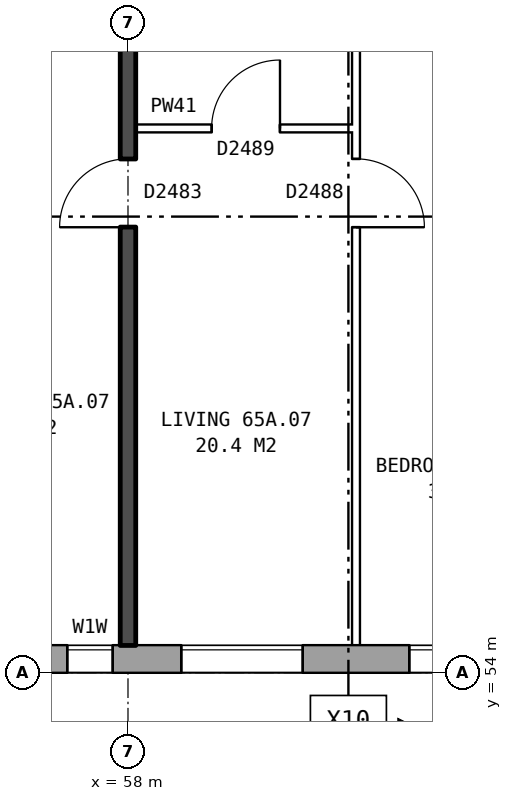
"""IFC4 building model, lengths in metres.
Left out: names, types, materials, properties, quantities, classifications, styles, units other than length and angle.
Written with IfcOpenShell. Run it as: python <this file> out.ifc"""

import sys

from ifc_helpers import new_model, si_unit, direction, frame, frame_2d, origin, place, context, subcontext, project, spatial, rectangle, extrude, element, fill, save


model = new_model("IFC4")
c1 = context("Model", 3, precision=1e-05, world=origin(), true_north=direction((0.0, 1.0)))
c2 = subcontext(c1, "Body", "Model", "MODEL_VIEW")
j1 = project(units=[si_unit("LENGTHUNIT", "METRE"), si_unit("PLANEANGLEUNIT", "RADIAN")], contexts=[c1])
p1 = place(None, origin())
s1 = spatial("IfcSite", under=j1, at=p1, CompositionType="ELEMENT")
p2 = place(p1, origin())
s2 = spatial("IfcBuilding", under=s1, at=p2, CompositionType="ELEMENT")
p3 = place(p2, frame((0.0, 0.0, 230.7)))
s3 = spatial("IfcBuildingStorey", under=s2, at=p3, CompositionType="ELEMENT", Elevation=230.7)
p4 = place(p3, frame((35.075, 54.18, 0.0), z_axis=(0.0, 0.0, 1.0), x_axis=(1.0, 0.0, 0.0)))
e1 = element("IfcWall", 1, at=p4, inside=s3, PredefinedType="STANDARD", context=c2, shape_type="SweptSolid", body=[
    extrude(rectangle(XDim=39.875, YDim=0.36, at=frame_2d((19.938, 0.0))), origin(), (0.0, 0.0, 1.0), 2.85),
])
p5 = place(p4, frame((2.625, 0.0, 0.8)))
e2 = element("IfcOpeningElement", 2, at=p5, cuts=e1, PredefinedType="OPENING", context=c2, shape_type="SweptSolid", body=[
    extrude(rectangle(XDim=1.6, YDim=1.8, at=frame_2d((0.8, 0.9))), frame((0.0, 0.19, 0.0), z_axis=(0.0, -1.0, 0.0), x_axis=(1.0, 0.0, 0.0)), (0.0, 0.0, 1.0), 0.38),
])
p6 = place(p4, frame((5.625, 0.0, 0.8)))
e3 = element("IfcOpeningElement", 3, at=p6, cuts=e1, PredefinedType="OPENING", context=c2, shape_type="SweptSolid", body=[
    extrude(rectangle(XDim=1.6, YDim=1.8, at=frame_2d((0.8, 0.9))), frame((0.0, 0.19, 0.0), z_axis=(0.0, -1.0, 0.0), x_axis=(1.0, 0.0, 0.0)), (0.0, 0.0, 1.0), 0.38),
])
p7 = place(p4, frame((8.625, 0.0, 0.8)))
e4 = element("IfcOpeningElement", 4, at=p7, cuts=e1, PredefinedType="OPENING", context=c2, shape_type="SweptSolid", body=[
    extrude(rectangle(XDim=1.6, YDim=1.8, at=frame_2d((0.8, 0.9))), frame((0.0, 0.19, 0.0), z_axis=(0.0, -1.0, 0.0), x_axis=(1.0, 0.0, 0.0)), (0.0, 0.0, 1.0), 0.38),
])
p8 = place(p4, frame((11.625, 0.0, 0.8)))
e5 = element("IfcOpeningElement", 5, at=p8, cuts=e1, PredefinedType="OPENING", context=c2, shape_type="SweptSolid", body=[
    extrude(rectangle(XDim=1.6, YDim=1.8, at=frame_2d((0.8, 0.9))), frame((0.0, 0.19, 0.0), z_axis=(0.0, -1.0, 0.0), x_axis=(1.0, 0.0, 0.0)), (0.0, 0.0, 1.0), 0.38),
])
p9 = place(p4, frame((14.075, 0.0, 0.8)))
e6 = element("IfcOpeningElement", 6, at=p9, cuts=e1, PredefinedType="OPENING", context=c2, shape_type="SweptSolid", body=[
    extrude(rectangle(XDim=1.0, YDim=1.8, at=frame_2d((0.5, 0.9))), frame((0.0, 0.19, 0.0), z_axis=(0.0, -1.0, 0.0), x_axis=(1.0, 0.0, 0.0)), (0.0, 0.0, 1.0), 0.38),
])
p10 = place(p4, frame((17.625, 0.0, 0.8)))
e7 = element("IfcOpeningElement", 7, at=p10, cuts=e1, PredefinedType="OPENING", context=c2, shape_type="SweptSolid", body=[
    extrude(rectangle(XDim=1.6, YDim=1.8, at=frame_2d((0.8, 0.9))), frame((0.0, 0.19, 0.0), z_axis=(0.0, -1.0, 0.0), x_axis=(1.0, 0.0, 0.0)), (0.0, 0.0, 1.0), 0.38),
])
p11 = place(p4, frame((20.125, 0.0, 0.8)))
e8 = element("IfcOpeningElement", 8, at=p11, cuts=e1, PredefinedType="OPENING", context=c2, shape_type="SweptSolid", body=[
    extrude(rectangle(XDim=0.6, YDim=1.2, at=frame_2d((0.3, 0.6))), frame((0.0, 0.19, 0.0), z_axis=(0.0, -1.0, 0.0), x_axis=(1.0, 0.0, 0.0)), (0.0, 0.0, 1.0), 0.38),
])
p12 = place(p4, frame((23.625, 0.0, 0.8)))
e9 = element("IfcOpeningElement", 9, at=p12, cuts=e1, PredefinedType="OPENING", context=c2, shape_type="SweptSolid", body=[
    extrude(rectangle(XDim=1.6, YDim=1.8, at=frame_2d((0.8, 0.9))), frame((0.0, 0.19, 0.0), z_axis=(0.0, -1.0, 0.0), x_axis=(1.0, 0.0, 0.0)), (0.0, 0.0, 1.0), 0.38),
])
p13 = place(p4, frame((26.625, 0.0, 0.8)))
e10 = element("IfcOpeningElement", 10, at=p13, cuts=e1, PredefinedType="OPENING", context=c2, shape_type="SweptSolid", body=[
    extrude(rectangle(XDim=1.6, YDim=1.8, at=frame_2d((0.8, 0.9))), frame((0.0, 0.19, 0.0), z_axis=(0.0, -1.0, 0.0), x_axis=(1.0, 0.0, 0.0)), (0.0, 0.0, 1.0), 0.38),
])
p14 = place(p4, frame((29.625, 0.0, 0.8)))
e11 = element("IfcOpeningElement", 11, at=p14, cuts=e1, PredefinedType="OPENING", context=c2, shape_type="SweptSolid", body=[
    extrude(rectangle(XDim=1.6, YDim=1.8, at=frame_2d((0.8, 0.9))), frame((0.0, 0.19, 0.0), z_axis=(0.0, -1.0, 0.0), x_axis=(1.0, 0.0, 0.0)), (0.0, 0.0, 1.0), 0.38),
])
p15 = place(p4, frame((32.625, 0.0, 0.8)))
e12 = element("IfcOpeningElement", 12, at=p15, cuts=e1, PredefinedType="OPENING", context=c2, shape_type="SweptSolid", body=[
    extrude(rectangle(XDim=1.6, YDim=1.8, at=frame_2d((0.8, 0.9))), frame((0.0, 0.19, 0.0), z_axis=(0.0, -1.0, 0.0), x_axis=(1.0, 0.0, 0.0)), (0.0, 0.0, 1.0), 0.38),
])
p16 = place(p4, frame((35.625, 0.0, 0.8)))
e13 = element("IfcOpeningElement", 13, at=p16, cuts=e1, PredefinedType="OPENING", context=c2, shape_type="SweptSolid", body=[
    extrude(rectangle(XDim=1.6, YDim=1.8, at=frame_2d((0.8, 0.9))), frame((0.0, 0.19, 0.0), z_axis=(0.0, -1.0, 0.0), x_axis=(1.0, 0.0, 0.0)), (0.0, 0.0, 1.0), 0.38),
])
p17 = place(p4, frame((22.125, 0.0, 1.7)))
e14 = element("IfcOpeningElement", 14, at=p17, cuts=e1, PredefinedType="OPENING", context=c2, shape_type="SweptSolid", body=[
    extrude(rectangle(XDim=0.6, YDim=0.9, at=frame_2d((0.3, 0.45))), frame((0.0, 0.19, 0.0), z_axis=(0.0, -1.0, 0.0), x_axis=(1.0, 0.0, 0.0)), (0.0, 0.0, 1.0), 0.38),
])
p18 = place(p3, frame((58.1, 61.16, 0.0), z_axis=(0.0, 0.0, 1.0), x_axis=(1.0, 0.0, 0.0)))
e15 = element("IfcWall", 15, at=p18, inside=s3, PredefinedType="PARTITIONING", context=c2, shape_type="SweptSolid", body=[
    extrude(rectangle(XDim=2.9, YDim=0.1, at=frame_2d((1.45, 0.0))), origin(), (0.0, 0.0, 1.0), 2.85),
])
p19 = place(p18, frame((1.0, 0.0, 0.0)))
e16 = element("IfcOpeningElement", 16, at=p19, cuts=e15, PredefinedType="OPENING", context=c2, shape_type="SweptSolid", body=[
    extrude(rectangle(XDim=0.9, YDim=2.1, at=frame_2d((0.45, 1.05))), frame((0.0, 0.06, 0.0), z_axis=(0.0, -1.0, 0.0), x_axis=(1.0, 0.0, 0.0)), (0.0, 0.0, 1.0), 0.12),
])
p20 = place(p3, frame((58.0, 54.36, 0.0), z_axis=(0.0, 0.0, 1.0), x_axis=(0.0, 1.0, 0.0)))
e17 = element("IfcWall", 17, at=p20, inside=s3, PredefinedType="SOLIDWALL", context=c2, shape_type="SweptSolid", body=[
    extrude(rectangle(XDim=14.44, YDim=0.2, at=frame_2d((7.22, 0.0))), origin(), (0.0, 0.0, 1.0), 2.85),
])
p21 = place(p20, frame((5.5, 0.0, 0.0)))
e18 = element("IfcOpeningElement", 18, at=p21, cuts=e17, PredefinedType="OPENING", context=c2, shape_type="SweptSolid", body=[
    extrude(rectangle(XDim=0.9, YDim=2.1, at=frame_2d((0.45, 1.05))), frame((0.0, 0.11, 0.0), z_axis=(0.0, -1.0, 0.0), x_axis=(1.0, 0.0, 0.0)), (0.0, 0.0, 1.0), 0.22),
])
p22 = place(p20, frame((13.24, 0.0, 0.0)))
e19 = element("IfcOpeningElement", 19, at=p22, cuts=e17, PredefinedType="OPENING", context=c2, shape_type="SweptSolid", body=[
    extrude(rectangle(XDim=0.8, YDim=2.1, at=frame_2d((0.4, 1.05))), frame((0.0, 0.11, 0.0), z_axis=(0.0, -1.0, 0.0), x_axis=(1.0, 0.0, 0.0)), (0.0, 0.0, 1.0), 0.22),
])
p23 = place(p3, frame((61.0, 54.36, 0.0), z_axis=(0.0, 0.0, 1.0), x_axis=(0.0, 1.0, 0.0)))
e20 = element("IfcWall", 20, at=p23, inside=s3, PredefinedType="PARTITIONING", context=c2, shape_type="SweptSolid", body=[
    extrude(rectangle(XDim=14.34, YDim=0.1, at=frame_2d((7.17, 0.0))), origin(), (0.0, 0.0, 1.0), 2.85),
])
p24 = place(p23, frame((5.5, 0.0, 0.0)))
e21 = element("IfcOpeningElement", 21, at=p24, cuts=e20, PredefinedType="OPENING", context=c2, shape_type="SweptSolid", body=[
    extrude(rectangle(XDim=0.9, YDim=2.1, at=frame_2d((0.45, 1.05))), frame((0.0, 0.06, 0.0), z_axis=(0.0, -1.0, 0.0), x_axis=(1.0, 0.0, 0.0)), (0.0, 0.0, 1.0), 0.12),
])
p25 = place(p23, frame((13.04, 0.0, 0.0)))
e22 = element("IfcOpeningElement", 22, at=p25, cuts=e20, PredefinedType="OPENING", context=c2, shape_type="SweptSolid", body=[
    extrude(rectangle(XDim=0.9, YDim=2.1, at=frame_2d((0.45, 1.05))), frame((0.0, 0.06, 0.0), z_axis=(0.0, -1.0, 0.0), x_axis=(1.0, 0.0, 0.0)), (0.0, 0.0, 1.0), 0.12),
])
p26 = place(p12, origin())
e23 = element("IfcWindow", 23, at=p26, inside=s3, PartitioningType="SINGLE_PANEL", PredefinedType="WINDOW", context=c2, shape_type="SweptSolid", body=[
    extrude(rectangle(XDim=1.6, YDim=1.8, at=frame_2d((0.8, 0.9))), frame((0.0, 0.15, 0.0), z_axis=(0.0, -1.0, 0.0), x_axis=(1.0, 0.0, 0.0)), (0.0, 0.0, 1.0), 0.06),
])
fill(e9, e23)
p27 = place(p13, origin())
e24 = element("IfcWindow", 24, at=p27, inside=s3, PartitioningType="SINGLE_PANEL", PredefinedType="WINDOW", context=c2, shape_type="SweptSolid", body=[
    extrude(rectangle(XDim=1.6, YDim=1.8, at=frame_2d((0.8, 0.9))), frame((0.0, 0.15, 0.0), z_axis=(0.0, -1.0, 0.0), x_axis=(1.0, 0.0, 0.0)), (0.0, 0.0, 1.0), 0.06),
])
fill(e10, e24)
p28 = place(p24, frame((0.9, 0.0, 0.0), z_axis=(0.0, 0.0, 1.0), x_axis=(-1.0, 0.0, 0.0)))
e25 = element("IfcDoor", 25, at=p28, inside=s3, OperationType="SINGLE_SWING_RIGHT", PredefinedType="DOOR", context=c2, shape_type="SweptSolid", body=[
    extrude(rectangle(XDim=0.9, YDim=2.1, at=frame_2d((0.45, 1.05))), frame((0.0, 0.025, 0.0), z_axis=(0.0, -1.0, 0.0), x_axis=(1.0, 0.0, 0.0)), (0.0, 0.0, 1.0), 0.05),
])
fill(e21, e25)
p29 = place(p21, origin())
e26 = element("IfcDoor", 26, at=p29, inside=s3, OperationType="SINGLE_SWING_LEFT", PredefinedType="DOOR", context=c2, shape_type="SweptSolid", body=[
    extrude(rectangle(XDim=0.9, YDim=2.1, at=frame_2d((0.45, 1.05))), frame((0.0, 0.025, 0.0), z_axis=(0.0, -1.0, 0.0), x_axis=(1.0, 0.0, 0.0)), (0.0, 0.0, 1.0), 0.05),
])
fill(e18, e26)
p30 = place(p19, origin())
e27 = element("IfcDoor", 27, at=p30, inside=s3, OperationType="SINGLE_SWING_RIGHT", PredefinedType="DOOR", context=c2, shape_type="SweptSolid", body=[
    extrude(rectangle(XDim=0.9, YDim=2.1, at=frame_2d((0.45, 1.05))), frame((0.0, 0.025, 0.0), z_axis=(0.0, -1.0, 0.0), x_axis=(1.0, 0.0, 0.0)), (0.0, 0.0, 1.0), 0.05),
])
fill(e16, e27)
p31 = place(p17, origin())
e28 = element("IfcWindow", 28, at=p31, inside=s3, PartitioningType="SINGLE_PANEL", PredefinedType="WINDOW", context=c2, shape_type="SweptSolid", body=[
    extrude(rectangle(XDim=0.6, YDim=0.9, at=frame_2d((0.3, 0.45))), frame((0.0, 0.15, 0.0), z_axis=(0.0, -1.0, 0.0), x_axis=(1.0, 0.0, 0.0)), (0.0, 0.0, 1.0), 0.06),
])
fill(e14, e28)
save(model, sys.argv[1])
